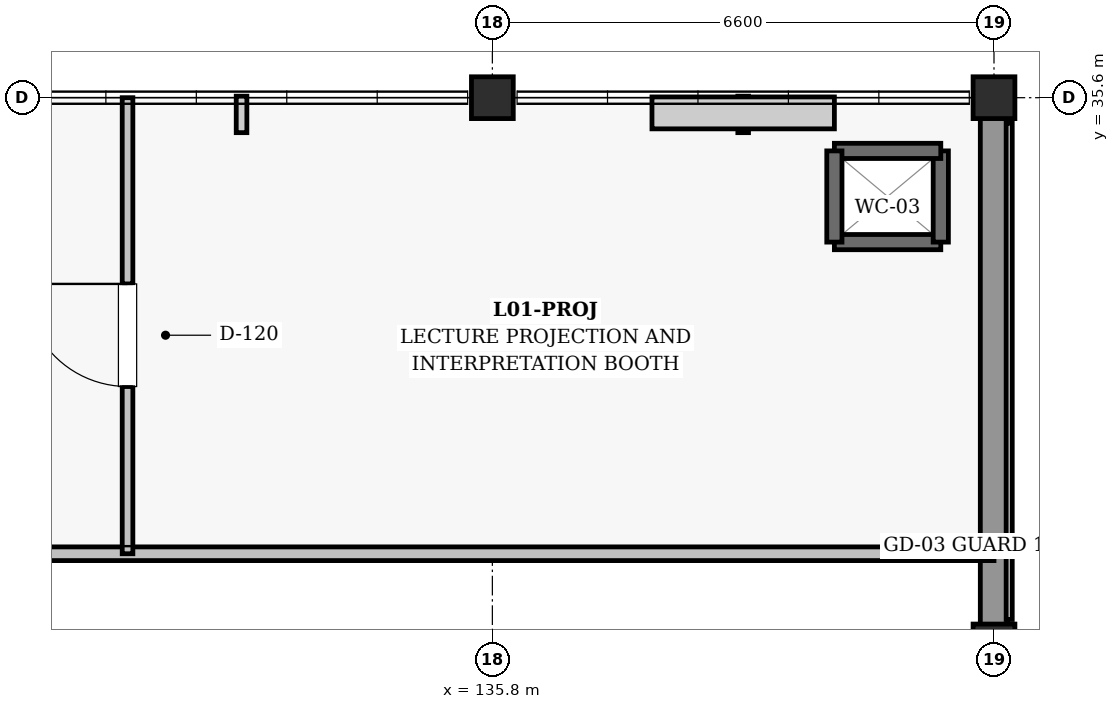
"""IFC4 building model, lengths in metres.
Left out: names, types, materials, properties, quantities, classifications, styles, units other than length and angle.
Written with IfcOpenShell. Run it as: python <this file> out.ifc"""

import sys

from ifc_helpers import new_model, si_unit, direction, frame, frame_2d, origin, origin_2d, place, context, subcontext, project, spatial, rectangle, extrude, element, fill, save


model = new_model("IFC4")
c1 = context("Model", 3, precision=1e-05, world=origin(), true_north=direction((0.0, 1.0)))
c2 = subcontext(c1, "Body", "Model", "MODEL_VIEW")
j1 = project(units=[si_unit("LENGTHUNIT", "METRE"), si_unit("PLANEANGLEUNIT", "RADIAN")], contexts=[c1])
p1 = place(None, origin())
s1 = spatial("IfcSite", under=j1, at=p1, CompositionType="ELEMENT")
p2 = place(p1, origin())
s2 = spatial("IfcBuilding", under=s1, at=p2, CompositionType="ELEMENT")
p3 = place(p2, frame((0.0, 0.0, 5.4)))
s3 = spatial("IfcBuildingStorey", under=s2, at=p3, CompositionType="ELEMENT", Elevation=5.4)
for number, where, z_axis, x_axis in (
    (1, (135.8, 35.6, 0.0), (0.0, 0.0, 1.0), (1.0, 0.0, 0.0)),
    (2, (142.4, 28.4, 0.0), (0.0, 0.0, 1.0), (1.0, 0.0, 0.0)),
    (3, (142.4, 35.6, 0.0), (0.0, 0.0, 1.0), (1.0, 0.0, 0.0)),
):
    element("IfcColumn", number, at=place(p3, frame(where, z_axis=z_axis, x_axis=x_axis)), inside=s3, PredefinedType="COLUMN", context=c2, shape_type="SweptSolid", body=[
        extrude(rectangle(XDim=0.55, YDim=0.55, at=origin_2d()), origin(), (0.0, 0.0, 1.0), 5.15),
    ])
p4 = place(p3, frame((142.4, 28.635, 0.0), z_axis=(0.0, 0.0, 1.0), x_axis=(0.0, 1.0, 0.0)))
e4 = element("IfcWall", 4, at=p4, inside=s3, PredefinedType="SOLIDWALL", context=c2, shape_type="SweptSolid", body=[
    extrude(rectangle(XDim=6.73, YDim=0.36, at=frame_2d((3.365, 0.0))), origin(), (0.0, 0.0, 1.0), 3.455),
])
p5 = place(p3, frame((140.3, 33.7, 0.0), z_axis=(0.0, 0.0, 1.0), x_axis=(1.0, 0.0, 0.0)))
e5 = element("IfcWall", 5, at=p5, inside=s3, PredefinedType="SHEAR", context=c2, shape_type="SweptSolid", body=[
    extrude(rectangle(XDim=1.4, YDim=0.2, at=frame_2d((0.7, 0.0))), origin(), (0.0, 0.0, 1.0), 4.14),
])
p6 = place(p3, frame((141.7, 33.7, 0.0), z_axis=(0.0, 0.0, 1.0), x_axis=(0.0, 1.0, 0.0)))
e6 = element("IfcWall", 6, at=p6, inside=s3, PredefinedType="SHEAR", context=c2, shape_type="SweptSolid", body=[
    extrude(rectangle(XDim=1.2, YDim=0.2, at=frame_2d((0.6, 0.0))), origin(), (0.0, 0.0, 1.0), 4.14),
])
p7 = place(p3, frame((141.7, 34.9, 0.0), z_axis=(0.0, 0.0, 1.0), x_axis=(-1.0, 0.0, 0.0)))
e7 = element("IfcWall", 7, at=p7, inside=s3, PredefinedType="SHEAR", context=c2, shape_type="SweptSolid", body=[
    extrude(rectangle(XDim=1.4, YDim=0.2, at=frame_2d((0.7, 0.0))), origin(), (0.0, 0.0, 1.0), 4.14),
])
p8 = place(p3, frame((140.3, 34.9, 0.0), z_axis=(0.0, 0.0, 1.0), x_axis=(0.0, -1.0, 0.0)))
e8 = element("IfcWall", 8, at=p8, inside=s3, PredefinedType="SHEAR", context=c2, shape_type="SweptSolid", body=[
    extrude(rectangle(XDim=1.2, YDim=0.2, at=frame_2d((0.6, 0.0))), origin(), (0.0, 0.0, 1.0), 4.14),
])
p9 = place(p3, frame((114.8, 29.6, 0.0), z_axis=(0.0, 0.0, 1.0), x_axis=(1.0, 0.0, 0.0)))
e9 = element("IfcWall", 9, at=p9, inside=s3, PredefinedType="SOLIDWALL", context=c2, shape_type="SweptSolid", body=[
    extrude(rectangle(XDim=27.6, YDim=0.18, at=frame_2d((13.8, 0.0))), origin(), (0.0, 0.0, 1.0), 3.46),
])
p10 = place(p3, frame((131.0, 29.6, 0.0), z_axis=(0.0, 0.0, 1.0), x_axis=(0.0, 1.0, 0.0)))
e10 = element("IfcWall", 10, at=p10, inside=s3, PredefinedType="PARTITIONING", context=c2, shape_type="SweptSolid", body=[
    extrude(rectangle(XDim=6.0, YDim=0.14, at=frame_2d((3.0, 0.0))), origin(), (0.0, 0.0, 1.0), 4.12),
])
p11 = place(p10, frame((2.2, 0.0, 0.0)))
e11 = element("IfcOpeningElement", 11, at=p11, cuts=e10, PredefinedType="OPENING", context=c2, shape_type="SweptSolid", body=[
    extrude(rectangle(XDim=1.35, YDim=2.2, at=frame_2d((0.675, 1.1))), frame((0.0, 0.08, 0.0), z_axis=(0.0, -1.0, 0.0), x_axis=(1.0, 0.0, 0.0)), (0.0, 0.0, 1.0), 0.16),
])
p12 = place(p11, origin())
e12 = element("IfcDoor", 12, at=p12, inside=s3, OperationType="SINGLE_SWING_RIGHT", PredefinedType="DOOR", context=c2, shape_type="SweptSolid", body=[
    extrude(rectangle(XDim=1.35, YDim=2.2, at=frame_2d((0.675, 1.1))), frame((0.0, 0.025, 0.0), z_axis=(0.0, -1.0, 0.0), x_axis=(1.0, 0.0, 0.0)), (0.0, 0.0, 1.0), 0.05),
])
fill(e11, e12)
save(model, sys.argv[1])
